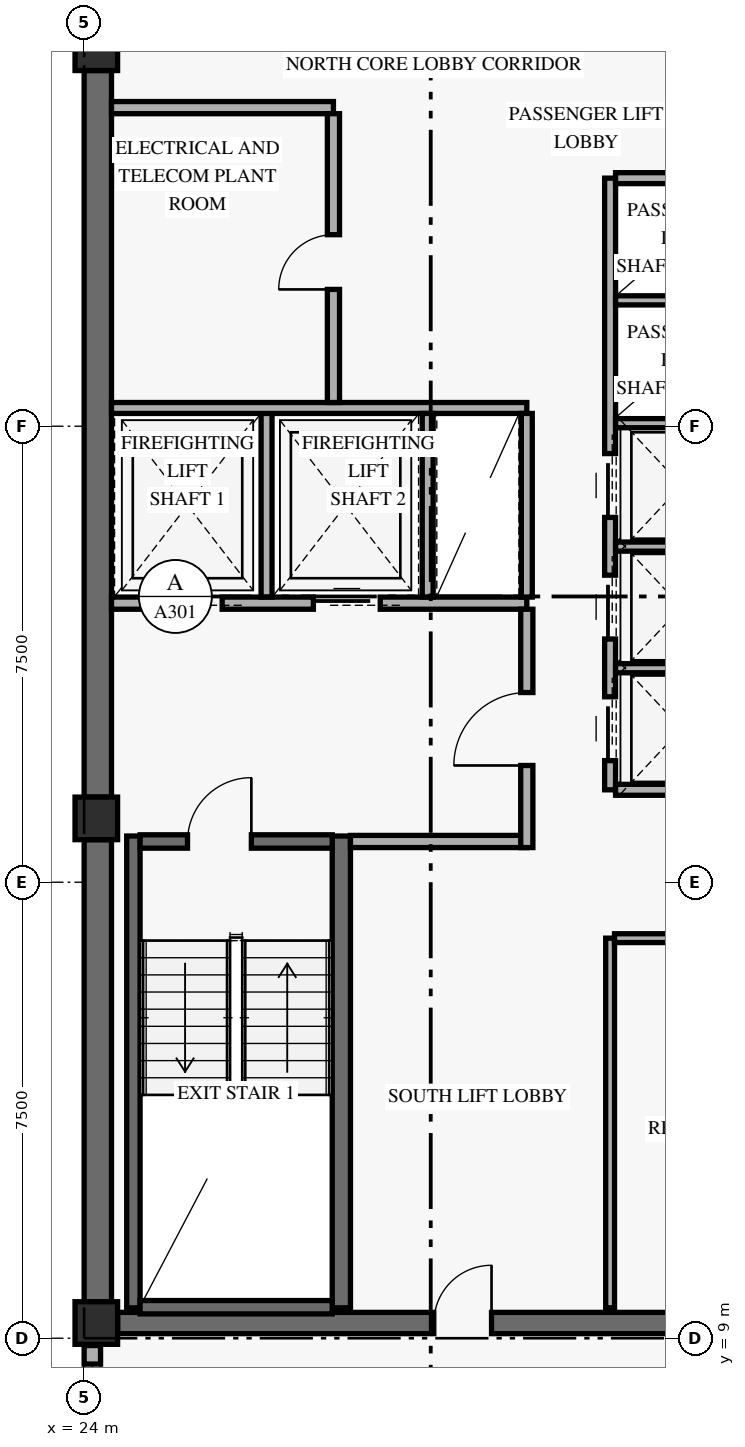
"""IFC4 building model, lengths in metres.
Left out: names, types, materials, properties, quantities, classifications, styles, units other than length and angle.
Written with IfcOpenShell. Run it as: python <this file> out.ifc"""

import sys

from ifc_helpers import new_model, si_unit, direction, frame, frame_2d, origin, origin_2d, place, context, subcontext, project, spatial, rectangle, extrude, element, fill, save


model = new_model("IFC4")
c1 = context("Model", 3, precision=1e-05, world=origin(), true_north=direction((0.0, 1.0)))
c2 = subcontext(c1, "Body", "Model", "MODEL_VIEW")
j1 = project(units=[si_unit("LENGTHUNIT", "METRE"), si_unit("PLANEANGLEUNIT", "RADIAN")], contexts=[c1])
p1 = place(None, origin())
s1 = spatial("IfcSite", under=j1, at=p1, CompositionType="ELEMENT")
p2 = place(p1, origin())
s2 = spatial("IfcBuilding", under=s1, at=p2, CompositionType="ELEMENT")
p3 = place(p2, frame((0.0, 0.0, 238.8)))
s3 = spatial("IfcBuildingStorey", under=s2, at=p3, CompositionType="ELEMENT", Elevation=238.8)
p4 = place(p3, frame((24.225, 9.6, 0.0), z_axis=(0.0, 0.0, 1.0), x_axis=(0.0, 1.0, 0.0)))
e1 = element("IfcWall", 1, at=p4, inside=s3, PredefinedType="SHEAR", context=c2, shape_type="SweptSolid", body=[
    extrude(rectangle(XDim=7.6, YDim=0.45, at=frame_2d((3.8, 0.0))), origin(), (0.0, 0.0, 1.0), 2.821),
])
p5 = place(p3, frame((24.225, 17.9, 0.0), z_axis=(0.0, 0.0, 1.0), x_axis=(0.0, 1.0, 0.0)))
e2 = element("IfcWall", 2, at=p5, inside=s3, PredefinedType="SHEAR", context=c2, shape_type="SweptSolid", body=[
    extrude(rectangle(XDim=11.95, YDim=0.45, at=frame_2d((5.975, 0.0))), origin(), (0.0, 0.0, 1.0), 2.821),
])
p6 = place(p3, frame((24.55, 9.25, 0.0), z_axis=(0.0, 0.0, 1.0), x_axis=(1.0, 0.0, 0.0)))
e3 = element("IfcWall", 3, at=p6, inside=s3, PredefinedType="SHEAR", context=c2, shape_type="SweptSolid", body=[
    extrude(rectangle(XDim=10.3, YDim=0.35, at=frame_2d((5.15, 0.0))), origin(), (0.0, 0.0, 1.0), 3.36),
])
p7 = place(p6, frame((5.2, 0.0, 0.0)))
e4 = element("IfcOpeningElement", 4, at=p7, cuts=e3, PredefinedType="OPENING", context=c2, shape_type="SweptSolid", body=[
    extrude(rectangle(XDim=0.95, YDim=2.15, at=frame_2d((0.475, 1.075))), frame((0.0, 0.185, 0.0), z_axis=(0.0, -1.0, 0.0), x_axis=(1.0, 0.0, 0.0)), (0.0, 0.0, 1.0), 0.37),
])
p8 = place(p3, frame((24.81, 9.5, 0.0), z_axis=(0.0, 0.0, 1.0), x_axis=(0.0, 1.0, 0.0)))
e5 = element("IfcWall", 5, at=p8, inside=s3, PredefinedType="SHEAR", context=c2, shape_type="SweptSolid", body=[
    extrude(rectangle(XDim=7.76, YDim=0.22, at=frame_2d((3.88, 0.0))), origin(), (0.0, 0.0, 1.0), 3.36),
])
p9 = place(p3, frame((28.23, 9.5, 0.0), z_axis=(0.0, 0.0, 1.0), x_axis=(0.0, 1.0, 0.0)))
e6 = element("IfcWall", 6, at=p9, inside=s3, PredefinedType="SHEAR", context=c2, shape_type="SweptSolid", body=[
    extrude(rectangle(XDim=7.76, YDim=0.3, at=frame_2d((3.88, 0.0))), origin(), (0.0, 0.0, 1.0), 3.36),
])
p10 = place(p3, frame((24.92, 9.51, 0.0), z_axis=(0.0, 0.0, 1.0), x_axis=(1.0, 0.0, 0.0)))
e7 = element("IfcWall", 7, at=p10, inside=s3, PredefinedType="SHEAR", context=c2, shape_type="SweptSolid", body=[
    extrude(rectangle(XDim=3.16, YDim=0.22, at=frame_2d((1.58, 0.0))), origin(), (0.0, 0.0, 1.0), 3.36),
])
p11 = place(p3, frame((24.92, 17.17, 0.0), z_axis=(0.0, 0.0, 1.0), x_axis=(1.0, 0.0, 0.0)))
e8 = element("IfcWall", 8, at=p11, inside=s3, PredefinedType="SHEAR", context=c2, shape_type="SweptSolid", body=[
    extrude(rectangle(XDim=3.16, YDim=0.22, at=frame_2d((1.58, 0.0))), origin(), (0.0, 0.0, 1.0), 3.36),
])
p12 = place(p11, frame((0.78, 0.0, 0.0)))
e9 = element("IfcOpeningElement", 9, at=p12, cuts=e8, PredefinedType="OPENING", context=c2, shape_type="SweptSolid", body=[
    extrude(rectangle(XDim=1.05, YDim=2.15, at=frame_2d((0.525, 1.075))), frame((0.0, 0.12, 0.0), z_axis=(0.0, -1.0, 0.0), x_axis=(1.0, 0.0, 0.0)), (0.0, 0.0, 1.0), 0.24),
])
for number, where, z_axis, x_axis in (
    (10, (24.2, 9.25, 0.0), (0.0, 0.0, 1.0), (1.0, 0.0, 0.0)),
    (11, (24.2, 17.55, 0.0), (0.0, 0.0, 1.0), (1.0, 0.0, 0.0)),
    (12, (24.2, 30.2, 0.0), (0.0, 0.0, 1.0), (1.0, 0.0, 0.0)),
):
    element("IfcColumn", number, at=place(p3, frame(where, z_axis=z_axis, x_axis=x_axis)), inside=s3, PredefinedType="COLUMN", context=c2, shape_type="SweptSolid", body=[
        extrude(rectangle(XDim=0.7, YDim=0.7, at=origin_2d()), origin(), (0.0, 0.0, 1.0), 3.6),
    ])
p13 = place(p3, frame((24.135, 7.32, 0.0), z_axis=(0.0, 0.0, 1.0), x_axis=(0.0, 1.0, 0.0)))
e13 = element("IfcWall", 13, at=p13, inside=s3, PredefinedType="SOLIDWALL", context=c2, shape_type="SweptSolid", body=[
    extrude(rectangle(XDim=1.56, YDim=0.27, at=frame_2d((0.78, 0.0))), origin(), (0.0, 0.0, 1.0), 2.803),
])
p14 = place(p13, frame((0.305, 0.0, 0.85)))
e14 = element("IfcOpeningElement", 14, at=p14, cuts=e13, PredefinedType="OPENING", context=c2, shape_type="SweptSolid", body=[
    extrude(rectangle(XDim=0.95, YDim=1.5, at=frame_2d((0.475, 0.75))), frame((0.0, 0.145, 0.0), z_axis=(0.0, -1.0, 0.0), x_axis=(1.0, 0.0, 0.0)), (0.0, 0.0, 1.0), 0.29),
])
p15 = place(p3, frame((24.45, 21.09, 0.0), z_axis=(0.0, 0.0, 1.0), x_axis=(1.0, 0.0, 0.0)))
e15 = element("IfcWall", 15, at=p15, inside=s3, PredefinedType="STANDARD", context=c2, shape_type="SweptSolid", body=[
    extrude(rectangle(XDim=6.83, YDim=0.2, at=frame_2d((3.415, 0.0))), origin(), (0.0, 0.0, 1.0), 3.36),
])
p16 = place(p15, frame((0.72, 0.0, 0.0)))
e16 = element("IfcOpeningElement", 16, at=p16, cuts=e15, PredefinedType="OPENING", context=c2, shape_type="SweptSolid", body=[
    extrude(rectangle(XDim=1.1, YDim=2.2, at=frame_2d((0.55, 1.1))), frame((0.0, 0.11, 0.0), z_axis=(0.0, -1.0, 0.0), x_axis=(1.0, 0.0, 0.0)), (0.0, 0.0, 1.0), 0.22),
])
p17 = place(p15, frame((3.32, 0.0, 0.0)))
e17 = element("IfcOpeningElement", 17, at=p17, cuts=e15, PredefinedType="OPENING", context=c2, shape_type="SweptSolid", body=[
    extrude(rectangle(XDim=1.1, YDim=2.2, at=frame_2d((0.55, 1.1))), frame((0.0, 0.11, 0.0), z_axis=(0.0, -1.0, 0.0), x_axis=(1.0, 0.0, 0.0)), (0.0, 0.0, 1.0), 0.22),
])
p18 = place(p3, frame((28.38, 17.17, 0.0), z_axis=(0.0, 0.0, 1.0), x_axis=(1.0, 0.0, 0.0)))
e18 = element("IfcWall", 18, at=p18, inside=s3, PredefinedType="STANDARD", context=c2, shape_type="SweptSolid", body=[
    extrude(rectangle(XDim=2.9, YDim=0.2, at=frame_2d((1.45, 0.0))), origin(), (0.0, 0.0, 1.0), 3.36),
])
p19 = place(p3, frame((31.28, 17.07, 0.0), z_axis=(0.0, 0.0, 1.0), x_axis=(0.0, 1.0, 0.0)))
e19 = element("IfcWall", 19, at=p19, inside=s3, PredefinedType="STANDARD", context=c2, shape_type="SweptSolid", body=[
    extrude(rectangle(XDim=3.92, YDim=0.2, at=frame_2d((1.96, 0.0))), origin(), (0.0, 0.0, 1.0), 2.803),
])
p20 = place(p19, frame((1.35, 0.0, 0.0)))
e20 = element("IfcOpeningElement", 20, at=p20, cuts=e19, PredefinedType="OPENING", context=c2, shape_type="SweptSolid", body=[
    extrude(rectangle(XDim=1.2, YDim=2.15, at=frame_2d((0.6, 1.075))), frame((0.0, 0.11, 0.0), z_axis=(0.0, -1.0, 0.0), x_axis=(1.0, 0.0, 0.0)), (0.0, 0.0, 1.0), 0.22),
])
p21 = place(p3, frame((27.0, 21.19, 0.0), z_axis=(0.0, 0.0, 1.0), x_axis=(0.0, 1.0, 0.0)))
e21 = element("IfcWall", 21, at=p21, inside=s3, PredefinedType="STANDARD", context=c2, shape_type="SweptSolid", body=[
    extrude(rectangle(XDim=3.11, YDim=0.18, at=frame_2d((1.555, 0.0))), origin(), (0.0, 0.0, 1.0), 3.36),
])
p22 = place(p3, frame((24.45, 24.3, 0.0), z_axis=(0.0, 0.0, 1.0), x_axis=(1.0, 0.0, 0.0)))
e22 = element("IfcWall", 22, at=p22, inside=s3, PredefinedType="STANDARD", context=c2, shape_type="SweptSolid", body=[
    extrude(rectangle(XDim=6.83, YDim=0.18, at=frame_2d((3.415, 0.0))), origin(), (0.0, 0.0, 1.0), 3.36),
])
for number, where, z_axis, x_axis in (
    (23, (29.65, 21.19, 0.0), (0.0, 0.0, 1.0), (0.0, 1.0, 0.0)),
    (24, (31.28, 21.19, 0.0), (0.0, 0.0, 1.0), (0.0, 1.0, 0.0)),
):
    element("IfcWall", number, at=place(p3, frame(where, z_axis=z_axis, x_axis=x_axis)), inside=s3, PredefinedType="STANDARD", context=c2, shape_type="SweptSolid", body=[
        extrude(rectangle(XDim=3.02, YDim=0.18, at=frame_2d((1.51, 0.0))), origin(), (0.0, 0.0, 1.0), 3.36),
    ])
p23 = place(p3, frame((24.45, 29.24, 0.0), z_axis=(0.0, 0.0, 1.0), x_axis=(1.0, 0.0, 0.0)))
e25 = element("IfcWall", 25, at=p23, inside=s3, PredefinedType="STANDARD", context=c2, shape_type="SweptSolid", body=[
    extrude(rectangle(XDim=3.65, YDim=0.2, at=frame_2d((1.825, 0.0))), origin(), (0.0, 0.0, 1.0), 3.36),
])
p24 = place(p3, frame((28.1, 24.39, 0.0), z_axis=(0.0, 0.0, 1.0), x_axis=(0.0, 1.0, 0.0)))
e26 = element("IfcWall", 26, at=p24, inside=s3, PredefinedType="STANDARD", context=c2, shape_type="SweptSolid", body=[
    extrude(rectangle(XDim=4.75, YDim=0.2, at=frame_2d((2.375, 0.0))), origin(), (0.0, 0.0, 1.0), 3.36),
])
p25 = place(p24, frame((1.86, 0.0, 0.0)))
e27 = element("IfcOpeningElement", 27, at=p25, cuts=e26, PredefinedType="OPENING", context=c2, shape_type="SweptSolid", body=[
    extrude(rectangle(XDim=0.9, YDim=2.1, at=frame_2d((0.45, 1.05))), frame((0.0, 0.11, 0.0), z_axis=(0.0, -1.0, 0.0), x_axis=(1.0, 0.0, 0.0)), (0.0, 0.0, 1.0), 0.22),
])
p26 = place(p3, frame((32.65, 18.02, 0.0), z_axis=(0.0, 0.0, 1.0), x_axis=(0.0, 1.0, 0.0)))
e28 = element("IfcWall", 28, at=p26, inside=s3, PredefinedType="STANDARD", context=c2, shape_type="SweptSolid", body=[
    extrude(rectangle(XDim=10.06, YDim=0.18, at=frame_2d((5.03, 0.0))), origin(), (0.0, 0.0, 1.0), 3.36),
])
p27 = place(p26, frame((0.48, 0.0, 0.0)))
e29 = element("IfcOpeningElement", 29, at=p27, cuts=e28, PredefinedType="OPENING", context=c2, shape_type="SweptSolid", body=[
    extrude(rectangle(XDim=1.05, YDim=2.2, at=frame_2d((0.525, 1.1))), frame((0.0, 0.1, 0.0), z_axis=(0.0, -1.0, 0.0), x_axis=(1.0, 0.0, 0.0)), (0.0, 0.0, 1.0), 0.2),
])
p28 = place(p26, frame((2.48, 0.0, 0.0)))
e30 = element("IfcOpeningElement", 30, at=p28, cuts=e28, PredefinedType="OPENING", context=c2, shape_type="SweptSolid", body=[
    extrude(rectangle(XDim=1.05, YDim=2.2, at=frame_2d((0.525, 1.1))), frame((0.0, 0.1, 0.0), z_axis=(0.0, -1.0, 0.0), x_axis=(1.0, 0.0, 0.0)), (0.0, 0.0, 1.0), 0.2),
])
p29 = place(p26, frame((4.48, 0.0, 0.0)))
e31 = element("IfcOpeningElement", 31, at=p29, cuts=e28, PredefinedType="OPENING", context=c2, shape_type="SweptSolid", body=[
    extrude(rectangle(XDim=1.05, YDim=2.2, at=frame_2d((0.525, 1.1))), frame((0.0, 0.1, 0.0), z_axis=(0.0, -1.0, 0.0), x_axis=(1.0, 0.0, 0.0)), (0.0, 0.0, 1.0), 0.2),
])
for number, where, z_axis, x_axis in (
    (32, (32.74, 18.02, 0.0), (0.0, 0.0, 1.0), (1.0, 0.0, 0.0)),
    (33, (32.74, 28.08, 0.0), (0.0, 0.0, 1.0), (1.0, 0.0, 0.0)),
):
    element("IfcWall", number, at=place(p3, frame(where, z_axis=z_axis, x_axis=x_axis)), inside=s3, PredefinedType="STANDARD", context=c2, shape_type="SweptSolid", body=[
        extrude(rectangle(XDim=2.26, YDim=0.18, at=frame_2d((1.13, 0.0))), origin(), (0.0, 0.0, 1.0), 3.36),
    ])
for number, where, z_axis, x_axis in (
    (34, (32.74, 20.02, 0.0), (0.0, 0.0, 1.0), (1.0, 0.0, 0.0)),
    (35, (32.74, 22.02, 0.0), (0.0, 0.0, 1.0), (1.0, 0.0, 0.0)),
    (36, (32.74, 24.05, 0.0), (0.0, 0.0, 1.0), (1.0, 0.0, 0.0)),
    (37, (32.74, 26.07, 0.0), (0.0, 0.0, 1.0), (1.0, 0.0, 0.0)),
):
    element("IfcWall", number, at=place(p3, frame(where, z_axis=z_axis, x_axis=x_axis)), inside=s3, PredefinedType="STANDARD", context=c2, shape_type="SweptSolid", body=[
        extrude(rectangle(XDim=2.26, YDim=0.15, at=frame_2d((1.13, 0.0))), origin(), (0.0, 0.0, 1.0), 3.36),
    ])
p30 = place(p3, frame((32.65, 9.5, 0.0), z_axis=(0.0, 0.0, 1.0), x_axis=(0.0, 1.0, 0.0)))
e38 = element("IfcWall", 38, at=p30, inside=s3, PredefinedType="PARTITIONING", context=c2, shape_type="SweptSolid", body=[
    extrude(rectangle(XDim=6.08, YDim=0.145, at=frame_2d((3.04, 0.0))), origin(), (0.0, 0.0, 1.0), 3.36),
])
p31 = place(p3, frame((32.722, 15.58, 0.0), z_axis=(0.0, 0.0, 1.0), x_axis=(1.0, 0.0, 0.0)))
e39 = element("IfcWall", 39, at=p31, inside=s3, PredefinedType="PARTITIONING", context=c2, shape_type="SweptSolid", body=[
    extrude(rectangle(XDim=4.828, YDim=0.145, at=frame_2d((2.414, 0.0))), origin(), (0.0, 0.0, 1.0), 2.803),
])
p32 = place(p31, frame((2.877, 0.0, 0.0)))
e40 = element("IfcOpeningElement", 40, at=p32, cuts=e39, PredefinedType="OPENING", context=c2, shape_type="SweptSolid", body=[
    extrude(rectangle(XDim=0.95, YDim=2.15, at=frame_2d((0.475, 1.075))), frame((0.0, 0.083, 0.0), z_axis=(0.0, -1.0, 0.0), x_axis=(1.0, 0.0, 0.0)), (0.0, 0.0, 1.0), 0.165),
])
p33 = place(p14, origin())
e41 = element("IfcWindow", 41, at=p33, inside=s3, PartitioningType="SINGLE_PANEL", PredefinedType="WINDOW", context=c2, shape_type="SweptSolid", body=[
    extrude(rectangle(XDim=0.95, YDim=1.5, at=frame_2d((0.475, 0.75))), frame((0.0, 0.03, 0.0), z_axis=(0.0, -1.0, 0.0), x_axis=(1.0, 0.0, 0.0)), (0.0, 0.0, 1.0), 0.06),
])
fill(e14, e41)
p34 = place(p12, frame((1.05, 0.0, 0.0), z_axis=(0.0, 0.0, 1.0), x_axis=(-1.0, 0.0, 0.0)))
e42 = element("IfcDoor", 42, at=p34, inside=s3, OperationType="SINGLE_SWING_LEFT", PredefinedType="DOOR", context=c2, shape_type="SweptSolid", body=[
    extrude(rectangle(XDim=1.05, YDim=2.15, at=frame_2d((0.525, 1.075))), frame((0.0, 0.025, 0.0), z_axis=(0.0, -1.0, 0.0), x_axis=(1.0, 0.0, 0.0)), (0.0, 0.0, 1.0), 0.05),
])
fill(e9, e42)
p35 = place(p16, origin())
e43 = element("IfcDoor", 43, at=p35, inside=s3, OperationType="SLIDING_TO_LEFT", PredefinedType="DOOR", context=c2, shape_type="SweptSolid", body=[
    extrude(rectangle(XDim=1.1, YDim=2.2, at=frame_2d((0.55, 1.1))), frame((0.0, 0.025, 0.0), z_axis=(0.0, -1.0, 0.0), x_axis=(1.0, 0.0, 0.0)), (0.0, 0.0, 1.0), 0.05),
])
fill(e16, e43)
p36 = place(p17, origin())
e44 = element("IfcDoor", 44, at=p36, inside=s3, OperationType="SLIDING_TO_LEFT", PredefinedType="DOOR", context=c2, shape_type="SweptSolid", body=[
    extrude(rectangle(XDim=1.1, YDim=2.2, at=frame_2d((0.55, 1.1))), frame((0.0, 0.025, 0.0), z_axis=(0.0, -1.0, 0.0), x_axis=(1.0, 0.0, 0.0)), (0.0, 0.0, 1.0), 0.05),
])
fill(e17, e44)
p37 = place(p20, origin())
e45 = element("IfcDoor", 45, at=p37, inside=s3, OperationType="SINGLE_SWING_LEFT", PredefinedType="DOOR", context=c2, shape_type="SweptSolid", body=[
    extrude(rectangle(XDim=1.2, YDim=2.15, at=frame_2d((0.6, 1.075))), frame((0.0, 0.025, 0.0), z_axis=(0.0, -1.0, 0.0), x_axis=(1.0, 0.0, 0.0)), (0.0, 0.0, 1.0), 0.05),
])
fill(e20, e45)
p38 = place(p25, origin())
e46 = element("IfcDoor", 46, at=p38, inside=s3, OperationType="SINGLE_SWING_LEFT", PredefinedType="DOOR", context=c2, shape_type="SweptSolid", body=[
    extrude(rectangle(XDim=0.9, YDim=2.1, at=frame_2d((0.45, 1.05))), frame((0.0, 0.025, 0.0), z_axis=(0.0, -1.0, 0.0), x_axis=(1.0, 0.0, 0.0)), (0.0, 0.0, 1.0), 0.05),
])
fill(e27, e46)
p39 = place(p27, origin())
e47 = element("IfcDoor", 47, at=p39, inside=s3, OperationType="SLIDING_TO_LEFT", PredefinedType="DOOR", context=c2, shape_type="SweptSolid", body=[
    extrude(rectangle(XDim=1.05, YDim=2.2, at=frame_2d((0.525, 1.1))), frame((0.0, 0.025, 0.0), z_axis=(0.0, -1.0, 0.0), x_axis=(1.0, 0.0, 0.0)), (0.0, 0.0, 1.0), 0.05),
])
fill(e29, e47)
p40 = place(p28, origin())
e48 = element("IfcDoor", 48, at=p40, inside=s3, OperationType="SLIDING_TO_LEFT", PredefinedType="DOOR", context=c2, shape_type="SweptSolid", body=[
    extrude(rectangle(XDim=1.05, YDim=2.2, at=frame_2d((0.525, 1.1))), frame((0.0, 0.025, 0.0), z_axis=(0.0, -1.0, 0.0), x_axis=(1.0, 0.0, 0.0)), (0.0, 0.0, 1.0), 0.05),
])
fill(e30, e48)
p41 = place(p29, origin())
e49 = element("IfcDoor", 49, at=p41, inside=s3, OperationType="SLIDING_TO_LEFT", PredefinedType="DOOR", context=c2, shape_type="SweptSolid", body=[
    extrude(rectangle(XDim=1.05, YDim=2.2, at=frame_2d((0.525, 1.1))), frame((0.0, 0.025, 0.0), z_axis=(0.0, -1.0, 0.0), x_axis=(1.0, 0.0, 0.0)), (0.0, 0.0, 1.0), 0.05),
])
fill(e31, e49)
p42 = place(p7, frame((0.95, 0.0, 0.0), z_axis=(0.0, 0.0, 1.0), x_axis=(-1.0, 0.0, 0.0)))
e50 = element("IfcDoor", 50, at=p42, inside=s3, OperationType="SINGLE_SWING_LEFT", PredefinedType="DOOR", context=c2, shape_type="SweptSolid", body=[
    extrude(rectangle(XDim=0.95, YDim=2.15, at=frame_2d((0.475, 1.075))), frame((0.0, 0.025, 0.0), z_axis=(0.0, -1.0, 0.0), x_axis=(1.0, 0.0, 0.0)), (0.0, 0.0, 1.0), 0.05),
])
fill(e4, e50)
save(model, sys.argv[1])
